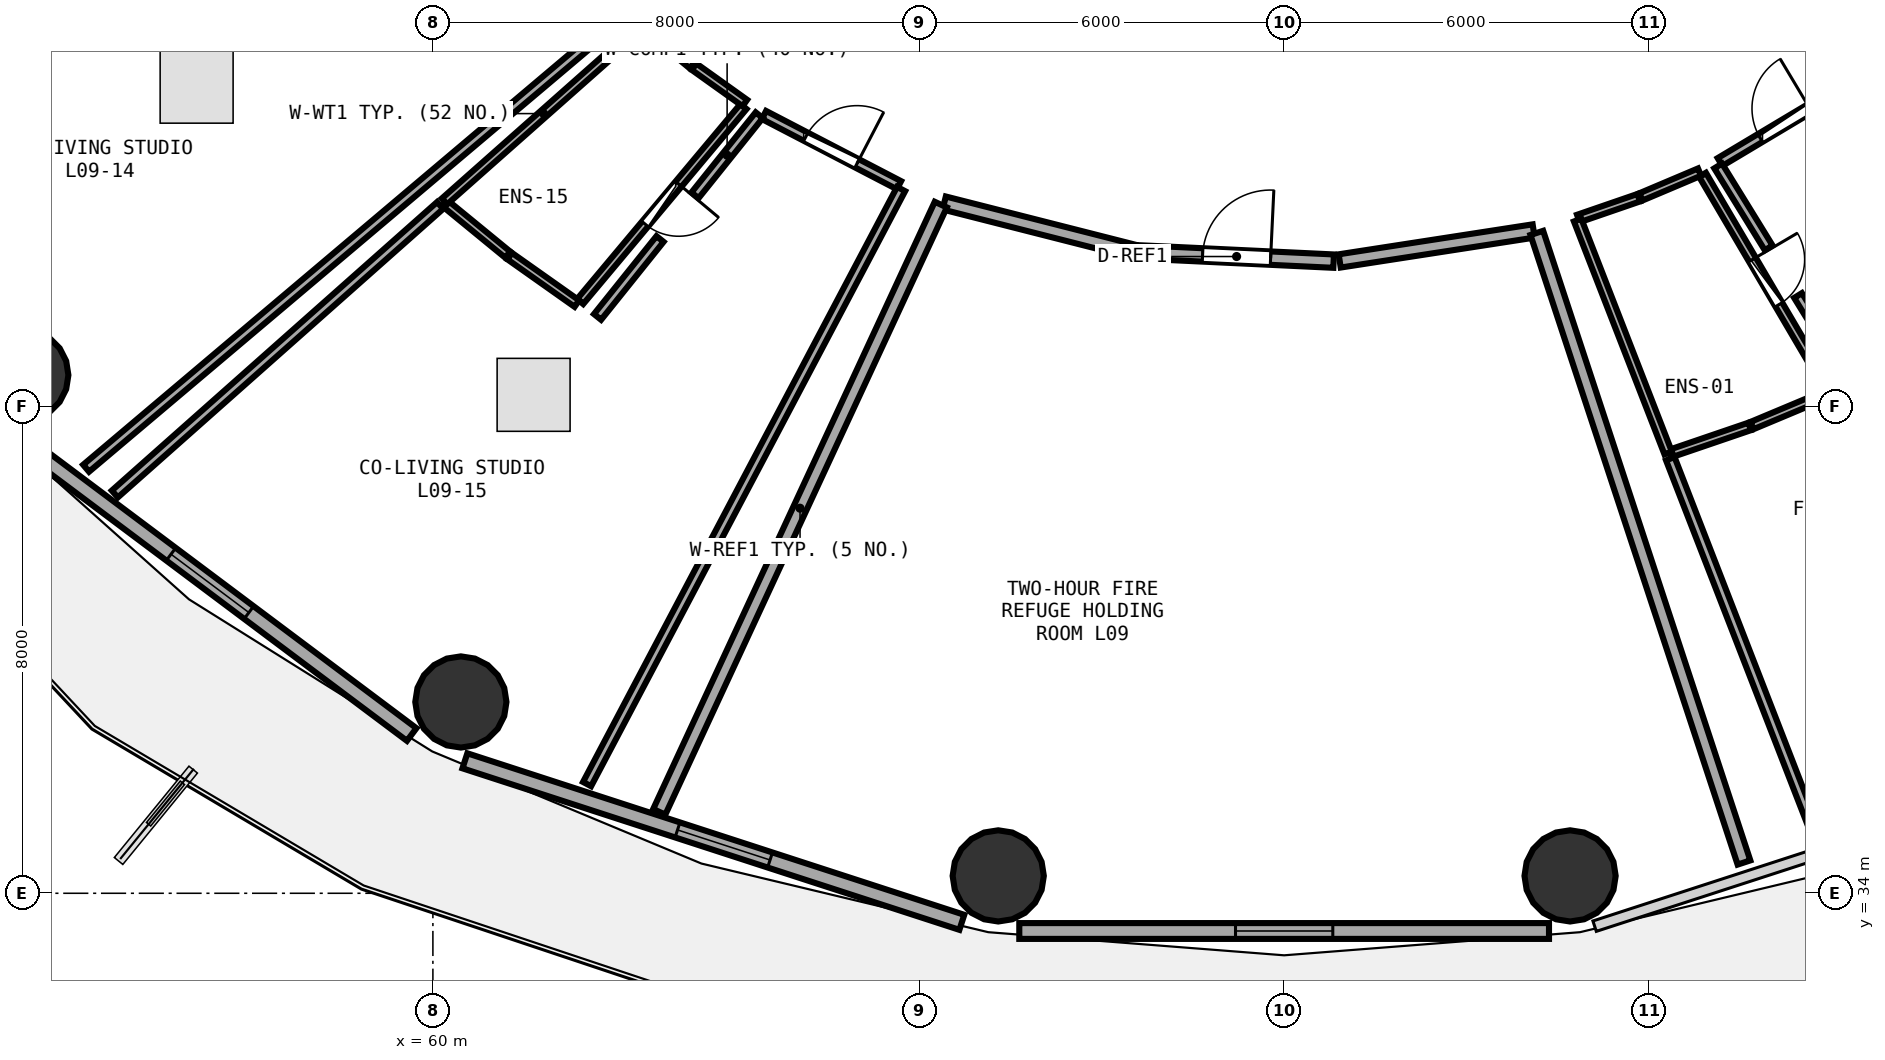
"""IFC4 building model, lengths in metres.
Left out: names, types, materials, properties, quantities, classifications, styles, units other than length and angle.
Written with IfcOpenShell. Run it as: python <this file> out.ifc"""

import sys

from ifc_helpers import new_model, si_unit, direction, frame, frame_2d, origin, origin_2d, place, context, subcontext, project, spatial, rectangle, circle, extrude, element, fill, save


model = new_model("IFC4")
c1 = context("Model", 3, precision=1e-05, world=origin(), true_north=direction((0.0, 1.0)))
c2 = subcontext(c1, "Body", "Model", "MODEL_VIEW")
j1 = project(units=[si_unit("LENGTHUNIT", "METRE"), si_unit("PLANEANGLEUNIT", "RADIAN")], contexts=[c1])
p1 = place(None, origin())
s1 = spatial("IfcSite", under=j1, at=p1, CompositionType="ELEMENT")
p2 = place(p1, origin())
s2 = spatial("IfcBuilding", under=s1, at=p2, CompositionType="ELEMENT")
p3 = place(p2, frame((0.0, 0.0, 37.5)))
s3 = spatial("IfcBuildingStorey", under=s2, at=p3, CompositionType="ELEMENT", Elevation=37.5)
for number, where, z_axis, x_axis in (
    (1, (53.256, 42.522, 0.0), (0.0, 0.0, 1.0), (1.0, 0.0, 0.0)),
    (2, (60.46, 37.146, 0.0), (0.0, 0.0, 1.0), (1.0, 0.0, 0.0)),
    (3, (69.298, 34.286, 0.0), (0.0, 0.0, 1.0), (1.0, 0.0, 0.0)),
    (4, (78.702, 34.286, 0.0), (0.0, 0.0, 1.0), (1.0, 0.0, 0.0)),
):
    element("IfcColumn", number, at=place(p3, frame(where, z_axis=z_axis, x_axis=x_axis)), inside=s3, PredefinedType="COLUMN", context=c2, shape_type="SweptSolid", body=[
        extrude(circle(Radius=0.75, at=origin_2d()), origin(), (0.0, 0.0, 1.0), 3.75),
    ])
p4 = place(p3, frame((53.016, 41.582, 0.0), z_axis=(0.0, 0.0, 1.0), x_axis=(0.80030733173, -0.599590005569, 0.0)))
e5 = element("IfcWall", 5, at=p4, inside=s3, PredefinedType="SOLIDWALL", context=c2, shape_type="SweptSolid", body=[
    extrude(rectangle(XDim=8.291, YDim=0.26, at=frame_2d((4.145, 0.0))), origin(), (0.0, 0.0, 1.0), 3.475),
])
p5 = place(p4, frame((3.345, 0.0, 0.85)))
e6 = element("IfcOpeningElement", 6, at=p5, cuts=e5, PredefinedType="OPENING", context=c2, shape_type="SweptSolid", body=[
    extrude(rectangle(XDim=1.6, YDim=1.45, at=frame_2d((0.8, 0.725))), frame((0.0, 0.14, 0.0), z_axis=(0.0, -1.0, 0.0), x_axis=(1.0, 0.0, 0.0)), (0.0, 0.0, 1.0), 0.28),
])
p6 = place(p3, frame((60.526, 36.178, 0.0), z_axis=(0.0, 0.0, 1.0), x_axis=(0.951039914291, -0.309068085421, 0.0)))
e7 = element("IfcWall", 7, at=p6, inside=s3, PredefinedType="SOLIDWALL", context=c2, shape_type="SweptSolid", body=[
    extrude(rectangle(XDim=8.594, YDim=0.26, at=frame_2d((4.297, 0.0))), origin(), (0.0, 0.0, 1.0), 3.475),
])
p7 = place(p6, frame((3.677, 0.0, 0.85)))
e8 = element("IfcOpeningElement", 8, at=p7, cuts=e7, PredefinedType="OPENING", context=c2, shape_type="SweptSolid", body=[
    extrude(rectangle(XDim=1.6, YDim=1.45, at=frame_2d((0.8, 0.725))), frame((0.0, 0.14, 0.0), z_axis=(0.0, -1.0, 0.0), x_axis=(1.0, 0.0, 0.0)), (0.0, 0.0, 1.0), 0.28),
])
p8 = place(p3, frame((69.644, 33.38, 0.0), z_axis=(0.0, 0.0, 1.0), x_axis=(1.0, 0.0, 0.0)))
e9 = element("IfcWall", 9, at=p8, inside=s3, PredefinedType="SOLIDWALL", context=c2, shape_type="SweptSolid", body=[
    extrude(rectangle(XDim=8.712, YDim=0.26, at=frame_2d((4.356, 0.0))), origin(), (0.0, 0.0, 1.0), 3.475),
])
p9 = place(p8, frame((3.556, 0.0, 0.85)))
e10 = element("IfcOpeningElement", 10, at=p9, cuts=e9, PredefinedType="OPENING", context=c2, shape_type="SweptSolid", body=[
    extrude(rectangle(XDim=1.6, YDim=1.45, at=frame_2d((0.8, 0.725))), frame((0.0, 0.14, 0.0), z_axis=(0.0, -1.0, 0.0), x_axis=(1.0, 0.0, 0.0)), (0.0, 0.0, 1.0), 0.28),
])
p10 = place(p3, frame((71.622, 44.547, 0.0), z_axis=(0.0, 0.0, 1.0), x_axis=(0.998877795438, -0.0473619022, 0.0)))
e11 = element("IfcWall", 11, at=p10, inside=s3, PredefinedType="SOLIDWALL", context=c2, shape_type="SweptSolid", body=[
    extrude(rectangle(XDim=3.196, YDim=0.22, at=frame_2d((1.598, 0.0))), origin(), (0.0, 0.0, 1.0), 3.235),
])
p11 = place(p10, frame((1.038, 0.0, 0.0)))
e12 = element("IfcOpeningElement", 12, at=p11, cuts=e11, PredefinedType="OPENING", context=c2, shape_type="SweptSolid", body=[
    extrude(rectangle(XDim=1.12, YDim=2.1, at=frame_2d((0.56, 1.05))), frame((0.0, 0.12, 0.0), z_axis=(0.0, -1.0, 0.0), x_axis=(1.0, 0.0, 0.0)), (0.0, 0.0, 1.0), 0.24),
])
p12 = place(p3, frame((80.88, 45.816, 0.0), z_axis=(0.0, 0.0, 1.0), x_axis=(0.506780508638, -0.862075122054, 0.0)))
e13 = element("IfcWall", 13, at=p12, inside=s3, PredefinedType="PLUMBINGWALL", context=c2, shape_type="SweptSolid", body=[
    extrude(rectangle(XDim=4.097, YDim=0.13, at=frame_2d((2.048, 0.0))), origin(), (0.0, 0.0, 1.0), 2.875),
])
p13 = place(p12, frame((1.618, 0.0, 0.0)))
e14 = element("IfcOpeningElement", 14, at=p13, cuts=e13, PredefinedType="OPENING", context=c2, shape_type="SweptSolid", body=[
    extrude(rectangle(XDim=0.86, YDim=2.05, at=frame_2d((0.43, 1.025))), frame((0.0, 0.075, 0.0), z_axis=(0.0, -1.0, 0.0), x_axis=(1.0, 0.0, 0.0)), (0.0, 0.0, 1.0), 0.15),
])
p14 = place(p3, frame((81.168, 46.026, 0.0), z_axis=(0.0, 0.0, 1.0), x_axis=(0.858417867387, 0.512951035627, 0.0)))
e15 = element("IfcWall", 15, at=p14, inside=s3, PredefinedType="PARTITIONING", context=c2, shape_type="SweptSolid", body=[
    extrude(rectangle(XDim=2.488, YDim=0.15, at=frame_2d((1.244, 0.0))), origin(), (0.0, 0.0, 1.0), 2.875),
])
p15 = place(p14, frame((0.769, 0.0, 0.0)))
e16 = element("IfcOpeningElement", 16, at=p15, cuts=e15, PredefinedType="OPENING", context=c2, shape_type="SweptSolid", body=[
    extrude(rectangle(XDim=0.95, YDim=2.08, at=frame_2d((0.475, 1.04))), frame((0.0, 0.085, 0.0), z_axis=(0.0, -1.0, 0.0), x_axis=(1.0, 0.0, 0.0)), (0.0, 0.0, 1.0), 0.17),
])
p16 = place(p3, frame((65.108, 46.939, 0.0), z_axis=(0.0, 0.0, 1.0), x_axis=(-0.642053950699, -0.766659457903, 0.0)))
e17 = element("IfcWall", 17, at=p16, inside=s3, PredefinedType="PLUMBINGWALL", context=c2, shape_type="SweptSolid", body=[
    extrude(rectangle(XDim=4.183, YDim=0.13, at=frame_2d((2.092, 0.0))), origin(), (0.0, 0.0, 1.0), 2.875),
])
p17 = place(p16, frame((1.662, 0.0, 0.0)))
e18 = element("IfcOpeningElement", 18, at=p17, cuts=e17, PredefinedType="OPENING", context=c2, shape_type="SweptSolid", body=[
    extrude(rectangle(XDim=0.86, YDim=2.05, at=frame_2d((0.43, 1.025))), frame((0.0, 0.075, 0.0), z_axis=(0.0, -1.0, 0.0), x_axis=(1.0, 0.0, 0.0)), (0.0, 0.0, 1.0), 0.15),
])
p18 = place(p3, frame((65.445, 46.799, 0.0), z_axis=(0.0, 0.0, 1.0), x_axis=(0.887232772645, -0.461322021093, 0.0)))
e19 = element("IfcWall", 19, at=p18, inside=s3, PredefinedType="PARTITIONING", context=c2, shape_type="SweptSolid", body=[
    extrude(rectangle(XDim=2.503, YDim=0.15, at=frame_2d((1.251, 0.0))), origin(), (0.0, 0.0, 1.0), 2.875),
])
p19 = place(p18, frame((0.776, 0.0, 0.0)))
e20 = element("IfcOpeningElement", 20, at=p19, cuts=e19, PredefinedType="OPENING", context=c2, shape_type="SweptSolid", body=[
    extrude(rectangle(XDim=0.95, YDim=2.08, at=frame_2d((0.475, 1.04))), frame((0.0, 0.085, 0.0), z_axis=(0.0, -1.0, 0.0), x_axis=(1.0, 0.0, 0.0)), (0.0, 0.0, 1.0), 0.17),
])
p20 = place(p3, frame((68.409, 45.352, 0.0), z_axis=(0.0, 0.0, 1.0), x_axis=(0.969137775127, -0.24651972096, 0.0)))
e21 = element("IfcWall", 21, at=p20, inside=s3, PredefinedType="SOLIDWALL", context=c2, shape_type="SweptSolid", body=[
    extrude(rectangle(XDim=3.214, YDim=0.22, at=frame_2d((1.607, 0.0))), origin(), (0.0, 0.0, 1.0), 3.235),
])
p21 = place(p3, frame((74.914, 44.399, 0.0), z_axis=(0.0, 0.0, 1.0), x_axis=(0.988282336333, 0.152636901479, 0.0)))
e22 = element("IfcWall", 22, at=p21, inside=s3, PredefinedType="SOLIDWALL", context=c2, shape_type="SweptSolid", body=[
    extrude(rectangle(XDim=3.228, YDim=0.22, at=frame_2d((1.614, 0.0))), origin(), (0.0, 0.0, 1.0), 3.235),
])
p22 = place(p3, frame((78.156, 44.86, 0.0), z_axis=(0.0, 0.0, 1.0), x_axis=(0.312563345706, -0.94989691805, 0.0)))
e23 = element("IfcWall", 23, at=p22, inside=s3, PredefinedType="SOLIDWALL", context=c2, shape_type="SweptSolid", body=[
    extrude(rectangle(XDim=10.9, YDim=0.22, at=frame_2d((5.45, 0.0))), origin(), (0.0, 0.0, 1.0), 2.875),
])
p23 = place(p3, frame((63.723, 35.339, 0.0), z_axis=(0.0, 0.0, 1.0), x_axis=(0.420652492624, 0.907221847427, 0.0)))
e24 = element("IfcWall", 24, at=p23, inside=s3, PredefinedType="SOLIDWALL", context=c2, shape_type="SweptSolid", body=[
    extrude(rectangle(XDim=11.008, YDim=0.22, at=frame_2d((5.504, 0.0))), origin(), (0.0, 0.0, 1.0), 2.875),
])
p24 = place(p3, frame((78.838, 45.096, 0.0), z_axis=(0.0, 0.0, 1.0), x_axis=(0.94549887916, 0.325625351451, 0.0)))
e25 = element("IfcWall", 25, at=p24, inside=s3, PredefinedType="PLUMBINGWALL", context=c2, shape_type="SweptSolid", body=[
    extrude(rectangle(XDim=1.05, YDim=0.13, at=frame_2d((0.525, 0.0))), origin(), (0.0, 0.0, 1.0), 3.48),
])
p25 = place(p3, frame((79.868, 45.453, 0.0), z_axis=(0.0, 0.0, 1.0), x_axis=(0.921054231529, 0.389434336677, 0.0)))
e26 = element("IfcWall", 26, at=p25, inside=s3, PredefinedType="PLUMBINGWALL", context=c2, shape_type="SweptSolid", body=[
    extrude(rectangle(XDim=1.046, YDim=0.13, at=frame_2d((0.523, 0.0))), origin(), (0.0, 0.0, 1.0), 2.875),
])
p26 = place(p3, frame((82.969, 42.225, 0.0), z_axis=(0.0, 0.0, 1.0), x_axis=(-0.922358986458, -0.38633392305, 0.0)))
e27 = element("IfcWall", 27, at=p26, inside=s3, PredefinedType="PLUMBINGWALL", context=c2, shape_type="SweptSolid", body=[
    extrude(rectangle(XDim=1.381, YDim=0.13, at=frame_2d((0.691, 0.0))), origin(), (0.0, 0.0, 1.0), 3.48),
])
p27 = place(p3, frame((81.657, 41.677, 0.0), z_axis=(0.0, 0.0, 1.0), x_axis=(-0.946374749486, -0.323070941954, 0.0)))
e28 = element("IfcWall", 28, at=p27, inside=s3, PredefinedType="PLUMBINGWALL", context=c2, shape_type="SweptSolid", body=[
    extrude(rectangle(XDim=1.39, YDim=0.13, at=frame_2d((0.695, 0.0))), origin(), (0.0, 0.0, 1.0), 3.175),
])
p28 = place(p3, frame((80.316, 41.24, 0.0), z_axis=(0.0, 0.0, 1.0), x_axis=(-0.362443394787, 0.932005786235, 0.0)))
e29 = element("IfcWall", 29, at=p28, inside=s3, PredefinedType="PLUMBINGWALL", context=c2, shape_type="SweptSolid", body=[
    extrude(rectangle(XDim=4.11, YDim=0.13, at=frame_2d((2.055, 0.0))), origin(), (0.0, 0.0, 1.0), 2.875),
])
p29 = place(p3, frame((82.795, 34.849, 0.0), z_axis=(0.0, 0.0, 1.0), x_axis=(-0.361912521495, 0.93221206106, 0.0)))
e30 = element("IfcWall", 30, at=p29, inside=s3, PredefinedType="PARTITIONING", context=c2, shape_type="SweptSolid", body=[
    extrude(rectangle(XDim=6.755, YDim=0.15, at=frame_2d((3.378, 0.0))), origin(), (0.0, 0.0, 1.0), 2.875),
])
p30 = place(p3, frame((83.336, 42.397, 0.0), z_axis=(0.0, 0.0, 1.0), x_axis=(-0.524816947244, 0.85121511493, 0.0)))
e31 = element("IfcWall", 31, at=p30, inside=s3, PredefinedType="PARTITIONING", context=c2, shape_type="SweptSolid", body=[
    extrude(rectangle(XDim=1.685, YDim=0.15, at=frame_2d((0.842, 0.0))), origin(), (0.0, 0.0, 1.0), 3.48),
])
p31 = place(p3, frame((81.969, 44.614, 0.0), z_axis=(0.0, 0.0, 1.0), x_axis=(-0.524983702504, 0.851112279376, 0.0)))
e32 = element("IfcWall", 32, at=p31, inside=s3, PredefinedType="PARTITIONING", context=c2, shape_type="SweptSolid", body=[
    extrude(rectangle(XDim=1.583, YDim=0.15, at=frame_2d((0.791, 0.0))), origin(), (0.0, 0.0, 1.0), 2.875),
])
p32 = place(p3, frame((63.177, 48.489, 0.0), z_axis=(0.0, 0.0, 1.0), x_axis=(-0.763989878534, -0.64522822745, 0.0)))
e33 = element("IfcWall", 33, at=p32, inside=s3, PredefinedType="PARTITIONING", context=c2, shape_type="SweptSolid", body=[
    extrude(rectangle(XDim=11.623, YDim=0.15, at=frame_2d((5.812, 0.0))), origin(), (0.0, 0.0, 1.0), 2.875),
])
p33 = place(p3, frame((63.48, 48.265, 0.0), z_axis=(0.0, 0.0, 1.0), x_axis=(0.770536510973, -0.637395862284, 0.0)))
e34 = element("IfcWall", 34, at=p33, inside=s3, PredefinedType="PLUMBINGWALL", context=c2, shape_type="SweptSolid", body=[
    extrude(rectangle(XDim=1.018, YDim=0.13, at=frame_2d((0.509, 0.0))), origin(), (0.0, 0.0, 1.0), 3.48),
])
p34 = place(p3, frame((64.296, 47.592, 0.0), z_axis=(0.0, 0.0, 1.0), x_axis=(0.813813924966, -0.581125541972, 0.0)))
e35 = element("IfcWall", 35, at=p34, inside=s3, PredefinedType="PLUMBINGWALL", context=c2, shape_type="SweptSolid", body=[
    extrude(rectangle(XDim=1.025, YDim=0.13, at=frame_2d((0.513, 0.0))), origin(), (0.0, 0.0, 1.0), 2.875),
])
p35 = place(p3, frame((62.368, 43.698, 0.0), z_axis=(0.0, 0.0, 1.0), x_axis=(-0.816732851218, 0.577015987422, 0.0)))
e36 = element("IfcWall", 36, at=p35, inside=s3, PredefinedType="PLUMBINGWALL", context=c2, shape_type="SweptSolid", body=[
    extrude(rectangle(XDim=1.354, YDim=0.13, at=frame_2d((0.677, 0.0))), origin(), (0.0, 0.0, 1.0), 3.48),
])
p36 = place(p3, frame((61.23, 44.503, 0.0), z_axis=(0.0, 0.0, 1.0), x_axis=(-0.773503213086, 0.633792378737, 0.0)))
e37 = element("IfcWall", 37, at=p36, inside=s3, PredefinedType="PLUMBINGWALL", context=c2, shape_type="SweptSolid", body=[
    extrude(rectangle(XDim=1.342, YDim=0.13, at=frame_2d((0.671, 0.0))), origin(), (0.0, 0.0, 1.0), 3.48),
])
p37 = place(p3, frame((60.192, 45.379, 0.0), z_axis=(0.0, 0.0, 1.0), x_axis=(0.748639888461, 0.662976860384, 0.0)))
e38 = element("IfcWall", 38, at=p37, inside=s3, PredefinedType="PLUMBINGWALL", context=c2, shape_type="SweptSolid", body=[
    extrude(rectangle(XDim=4.352, YDim=0.13, at=frame_2d((2.176, 0.0))), origin(), (0.0, 0.0, 1.0), 3.235),
])
p38 = place(p3, frame((67.7, 45.582, 0.0), z_axis=(0.0, 0.0, 1.0), x_axis=(-0.466733692948, -0.884397908109, 0.0)))
e39 = element("IfcWall", 39, at=p38, inside=s3, PredefinedType="PARTITIONING", context=c2, shape_type="SweptSolid", body=[
    extrude(rectangle(XDim=11.065, YDim=0.15, at=frame_2d((5.533, 0.0))), origin(), (0.0, 0.0, 1.0), 2.875),
])
p39 = place(p3, frame((54.769, 40.566, 0.0), z_axis=(0.0, 0.0, 1.0), x_axis=(0.748154724485, 0.663524308697, 0.0)))
e40 = element("IfcWall", 40, at=p39, inside=s3, PredefinedType="PARTITIONING", context=c2, shape_type="SweptSolid", body=[
    extrude(rectangle(XDim=7.151, YDim=0.15, at=frame_2d((3.576, 0.0))), origin(), (0.0, 0.0, 1.0), 2.875),
])
p40 = place(p3, frame((62.708, 43.478, 0.0), z_axis=(0.0, 0.0, 1.0), x_axis=(0.62551026357, 0.780215938166, 0.0)))
e41 = element("IfcWall", 41, at=p40, inside=s3, PredefinedType="PARTITIONING", context=c2, shape_type="SweptSolid", body=[
    extrude(rectangle(XDim=1.643, YDim=0.15, at=frame_2d((0.821, 0.0))), origin(), (0.0, 0.0, 1.0), 2.875),
])
p41 = place(p3, frame((64.311, 45.478, 0.0), z_axis=(0.0, 0.0, 1.0), x_axis=(0.625347243109, 0.780346606026, 0.0)))
e42 = element("IfcWall", 42, at=p41, inside=s3, PredefinedType="PARTITIONING", context=c2, shape_type="SweptSolid", body=[
    extrude(rectangle(XDim=1.688, YDim=0.15, at=frame_2d((0.844, 0.0))), origin(), (0.0, 0.0, 1.0), 3.235),
])
p42 = place(p5, origin())
e43 = element("IfcWindow", 43, at=p42, inside=s3, PartitioningType="SINGLE_PANEL", PredefinedType="WINDOW", context=c2, shape_type="SweptSolid", body=[
    extrude(rectangle(XDim=1.6, YDim=1.45, at=frame_2d((0.8, 0.725))), frame((0.0, 0.03, 0.0), z_axis=(0.0, -1.0, 0.0), x_axis=(1.0, 0.0, 0.0)), (0.0, 0.0, 1.0), 0.06),
])
fill(e6, e43)
p43 = place(p7, origin())
e44 = element("IfcWindow", 44, at=p43, inside=s3, PartitioningType="SINGLE_PANEL", PredefinedType="WINDOW", context=c2, shape_type="SweptSolid", body=[
    extrude(rectangle(XDim=1.6, YDim=1.45, at=frame_2d((0.8, 0.725))), frame((0.0, 0.03, 0.0), z_axis=(0.0, -1.0, 0.0), x_axis=(1.0, 0.0, 0.0)), (0.0, 0.0, 1.0), 0.06),
])
fill(e8, e44)
p44 = place(p9, origin())
e45 = element("IfcWindow", 45, at=p44, inside=s3, PartitioningType="SINGLE_PANEL", PredefinedType="WINDOW", context=c2, shape_type="SweptSolid", body=[
    extrude(rectangle(XDim=1.6, YDim=1.45, at=frame_2d((0.8, 0.725))), frame((0.0, 0.03, 0.0), z_axis=(0.0, -1.0, 0.0), x_axis=(1.0, 0.0, 0.0)), (0.0, 0.0, 1.0), 0.06),
])
fill(e10, e45)
p45 = place(p11, origin())
e46 = element("IfcDoor", 46, at=p45, inside=s3, OperationType="SINGLE_SWING_RIGHT", PredefinedType="DOOR", context=c2, shape_type="SweptSolid", body=[
    extrude(rectangle(XDim=1.12, YDim=2.1, at=frame_2d((0.56, 1.05))), frame((0.0, 0.025, 0.0), z_axis=(0.0, -1.0, 0.0), x_axis=(1.0, 0.0, 0.0)), (0.0, 0.0, 1.0), 0.05),
])
fill(e12, e46)
p46 = place(p13, origin())
e47 = element("IfcDoor", 47, at=p46, inside=s3, OperationType="SINGLE_SWING_LEFT", PredefinedType="DOOR", context=c2, shape_type="SweptSolid", body=[
    extrude(rectangle(XDim=0.86, YDim=2.05, at=frame_2d((0.43, 1.025))), frame((0.0, 0.025, 0.0), z_axis=(0.0, -1.0, 0.0), x_axis=(1.0, 0.0, 0.0)), (0.0, 0.0, 1.0), 0.05),
])
fill(e14, e47)
p47 = place(p15, origin())
e48 = element("IfcDoor", 48, at=p47, inside=s3, OperationType="SINGLE_SWING_RIGHT", PredefinedType="DOOR", context=c2, shape_type="SweptSolid", body=[
    extrude(rectangle(XDim=0.95, YDim=2.08, at=frame_2d((0.475, 1.04))), frame((0.0, 0.025, 0.0), z_axis=(0.0, -1.0, 0.0), x_axis=(1.0, 0.0, 0.0)), (0.0, 0.0, 1.0), 0.05),
])
fill(e16, e48)
p48 = place(p17, origin())
e49 = element("IfcDoor", 49, at=p48, inside=s3, OperationType="SINGLE_SWING_LEFT", PredefinedType="DOOR", context=c2, shape_type="SweptSolid", body=[
    extrude(rectangle(XDim=0.86, YDim=2.05, at=frame_2d((0.43, 1.025))), frame((0.0, 0.025, 0.0), z_axis=(0.0, -1.0, 0.0), x_axis=(1.0, 0.0, 0.0)), (0.0, 0.0, 1.0), 0.05),
])
fill(e18, e49)
p49 = place(p19, origin())
e50 = element("IfcDoor", 50, at=p49, inside=s3, OperationType="SINGLE_SWING_RIGHT", PredefinedType="DOOR", context=c2, shape_type="SweptSolid", body=[
    extrude(rectangle(XDim=0.95, YDim=2.08, at=frame_2d((0.475, 1.04))), frame((0.0, 0.025, 0.0), z_axis=(0.0, -1.0, 0.0), x_axis=(1.0, 0.0, 0.0)), (0.0, 0.0, 1.0), 0.05),
])
fill(e20, e50)
save(model, sys.argv[1])
